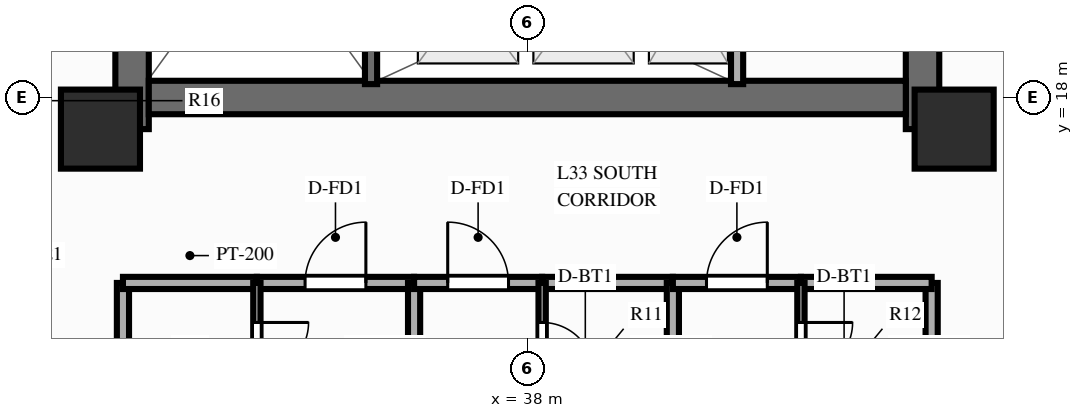
"""IFC4 building model, lengths in metres.
Left out: names, types, materials, properties, quantities, classifications, styles, units other than length and angle.
Written with IfcOpenShell. Run it as: python <this file> out.ifc"""

import sys

from ifc_helpers import new_model, si_unit, direction, frame, frame_2d, origin, origin_2d, place, context, subcontext, project, spatial, rectangle, extrude, source, transform, mapped, element, fill, save


model = new_model("IFC4")
c1 = context("Model", 3, precision=1e-05, world=origin(), true_north=direction((0.0, 1.0)))
c2 = subcontext(c1, "Body", "Model", "MODEL_VIEW")
j1 = project(units=[si_unit("LENGTHUNIT", "METRE"), si_unit("PLANEANGLEUNIT", "RADIAN")], contexts=[c1])
p1 = place(None, origin())
s1 = spatial("IfcSite", under=j1, at=p1, CompositionType="ELEMENT")
p2 = place(p1, origin())
s2 = spatial("IfcBuilding", under=s1, at=p2, CompositionType="ELEMENT")
p3 = place(p2, frame((0.0, 0.0, 104.85)))
s3 = spatial("IfcBuildingStorey", under=s2, at=p3, CompositionType="ELEMENT", Elevation=104.85)
p4 = place(p3, frame((31.5, 17.48, 0.0), z_axis=(0.0, 0.0, 1.0), x_axis=(0.0, 1.0, 0.0)))
e1 = element("IfcWall", 1, at=p4, inside=s3, PredefinedType="SHEAR", context=c2, shape_type="SweptSolid", body=[
    extrude(rectangle(XDim=19.04, YDim=0.55, at=frame_2d((9.52, 0.0))), origin(), (0.0, 0.0, 1.0), 3.0),
])
p5 = place(p4, frame((6.32, 0.0, 0.0)))
e2 = element("IfcOpeningElement", 2, at=p5, cuts=e1, PredefinedType="OPENING", context=c2, shape_type="SweptSolid", body=[
    extrude(rectangle(XDim=1.1, YDim=2.15, at=frame_2d((0.55, 1.075))), frame((0.0, 0.287, 0.0), z_axis=(0.0, -1.0, 0.0), x_axis=(1.0, 0.0, 0.0)), (0.0, 0.0, 1.0), 0.574),
])
p6 = place(p3, frame((44.5, 17.48, 0.0), z_axis=(0.0, 0.0, 1.0), x_axis=(0.0, 1.0, 0.0)))
e3 = element("IfcWall", 3, at=p6, inside=s3, PredefinedType="SHEAR", context=c2, shape_type="SweptSolid", body=[
    extrude(rectangle(XDim=19.04, YDim=0.55, at=frame_2d((9.52, 0.0))), origin(), (0.0, 0.0, 1.0), 3.0),
])
p7 = place(p6, frame((12.67, 0.0, 0.0), z_axis=(0.0, 0.0, 1.0), x_axis=(-1.0, 0.0, 0.0)))
e4 = element("IfcOpeningElement", 4, at=p7, cuts=e3, PredefinedType="OPENING", context=c2, shape_type="SweptSolid", body=[
    extrude(rectangle(XDim=1.1, YDim=2.15, at=frame_2d((0.55, 1.075))), frame((0.0, 0.287, 0.0), z_axis=(0.0, -1.0, 0.0), x_axis=(1.0, 0.0, 0.0)), (0.0, 0.0, 1.0), 0.574),
])
p8 = place(p3, frame((31.775, 18.0, 0.0), z_axis=(0.0, 0.0, 1.0), x_axis=(1.0, 0.0, 0.0)))
e5 = element("IfcWall", 5, at=p8, inside=s3, PredefinedType="SHEAR", context=c2, shape_type="SweptSolid", body=[
    extrude(rectangle(XDim=12.45, YDim=0.55, at=frame_2d((6.225, 0.0))), origin(), (0.0, 0.0, 1.0), 3.0),
])
m1 = source(origin(), c2, "Body", "SweptSolid", [
    extrude(rectangle(XDim=1.3, YDim=1.3, at=origin_2d()), origin(), (0.0, 0.0, 1.0), 3.0),
])
for number, where, z_axis, x_axis in (
    (6, (30.98, 17.48, 0.0), (0.0, 0.0, 1.0), (1.0, 0.0, 0.0)),
    (7, (45.02, 17.48, 0.0), (0.0, 0.0, 1.0), (1.0, 0.0, 0.0)),
):
    element("IfcColumn", number, at=place(p3, frame(where, z_axis=z_axis, x_axis=x_axis)), inside=s3, PredefinedType="COLUMN", context=c2, shape_type="MappedRepresentation", body=[
        mapped(m1, transform((0.0, 0.0, 0.0), scale=1.0)),
    ])
p9 = place(p3, frame((41.45, 18.22, 0.0), z_axis=(0.0, 0.0, 1.0), x_axis=(0.0, 1.0, 0.0)))
e8 = element("IfcWall", 8, at=p9, inside=s3, PredefinedType="PARTITIONING", context=c2, shape_type="SweptSolid", body=[
    extrude(rectangle(XDim=2.86, YDim=0.2, at=frame_2d((1.43, 0.0))), origin(), (0.0, 0.0, 1.0), 2.79),
])
p10 = place(p3, frame((35.43, 18.22, 0.0), z_axis=(0.0, 0.0, 1.0), x_axis=(0.0, 1.0, 0.0)))
e9 = element("IfcWall", 9, at=p10, inside=s3, PredefinedType="SOLIDWALL", context=c2, shape_type="SweptSolid", body=[
    extrude(rectangle(XDim=7.22, YDim=0.2, at=frame_2d((3.61, 0.0))), origin(), (0.0, 0.0, 1.0), 2.79),
])
p11 = place(p10, frame((6.68, 0.0, 0.0), z_axis=(0.0, 0.0, 1.0), x_axis=(-1.0, 0.0, 0.0)))
e10 = element("IfcOpeningElement", 10, at=p11, cuts=e9, PredefinedType="OPENING", context=c2, shape_type="SweptSolid", body=[
    extrude(rectangle(XDim=1.1, YDim=2.15, at=frame_2d((0.55, 1.075))), frame((0.0, 0.112, 0.0), z_axis=(0.0, -1.0, 0.0), x_axis=(1.0, 0.0, 0.0)), (0.0, 0.0, 1.0), 0.224),
])
for number, where, z_axis, x_axis in (
    (11, (31.35, 14.95, 0.0), (0.0, 0.0, 1.0), (0.0, -1.0, 0.0)),
    (12, (44.65, 14.95, 0.0), (0.0, 0.0, 1.0), (0.0, -1.0, 0.0)),
):
    element("IfcWall", number, at=place(p3, frame(where, z_axis=z_axis, x_axis=x_axis)), inside=s3, PredefinedType="PARTITIONING", context=c2, shape_type="SweptSolid", body=[
        extrude(rectangle(XDim=11.8, YDim=0.2, at=frame_2d((5.9, 0.0))), origin(), (0.0, 0.0, 1.0), 2.34),
    ])
p12 = place(p3, frame((31.35, 14.95, 0.0), z_axis=(0.0, 0.0, 1.0), x_axis=(1.0, 0.0, 0.0)))
e13 = element("IfcWall", 13, at=p12, inside=s3, PredefinedType="PARTITIONING", context=c2, shape_type="SweptSolid", body=[
    extrude(rectangle(XDim=2.202, YDim=0.2, at=frame_2d((1.101, 0.0))), origin(), (0.0, 0.0, 1.0), 2.79),
])
p13 = place(p3, frame((33.552, 14.95, 0.0), z_axis=(0.0, 0.0, 1.0), x_axis=(1.0, 0.0, 0.0)))
e14 = element("IfcWall", 14, at=p13, inside=s3, PredefinedType="PARTITIONING", context=c2, shape_type="SweptSolid", body=[
    extrude(rectangle(XDim=2.585, YDim=0.2, at=frame_2d((1.293, 0.0))), origin(), (0.0, 0.0, 1.0), 2.79),
])
p14 = place(p13, frame((0.793, 0.0, 0.0)))
e15 = element("IfcOpeningElement", 15, at=p14, cuts=e14, PredefinedType="OPENING", context=c2, shape_type="SweptSolid", body=[
    extrude(rectangle(XDim=1.0, YDim=2.15, at=frame_2d((0.5, 1.075))), frame((0.0, 0.112, 0.0), z_axis=(0.0, -1.0, 0.0), x_axis=(1.0, 0.0, 0.0)), (0.0, 0.0, 1.0), 0.224),
])
p15 = place(p3, frame((33.552, 14.95, 0.0), z_axis=(0.0, 0.0, 1.0), x_axis=(0.0, -1.0, 0.0)))
e16 = element("IfcWall", 16, at=p15, inside=s3, PredefinedType="PARTITIONING", context=c2, shape_type="SweptSolid", body=[
    extrude(rectangle(XDim=2.15, YDim=0.12, at=frame_2d((1.075, 0.0))), origin(), (0.0, 0.0, 1.0), 2.79),
])
p16 = place(p15, frame((0.65, 0.0, 0.0)))
e17 = element("IfcOpeningElement", 17, at=p16, cuts=e16, PredefinedType="OPENING", context=c2, shape_type="SweptSolid", body=[
    extrude(rectangle(XDim=0.85, YDim=2.05, at=frame_2d((0.425, 1.025))), frame((0.0, 0.072, 0.0), z_axis=(0.0, -1.0, 0.0), x_axis=(1.0, 0.0, 0.0)), (0.0, 0.0, 1.0), 0.144),
])
p17 = place(p3, frame((36.138, 14.95, 0.0), z_axis=(0.0, 0.0, 1.0), x_axis=(0.0, -1.0, 0.0)))
e18 = element("IfcWall", 18, at=p17, inside=s3, PredefinedType="PARTITIONING", context=c2, shape_type="SweptSolid", body=[
    extrude(rectangle(XDim=11.8, YDim=0.2, at=frame_2d((5.9, 0.0))), origin(), (0.0, 0.0, 1.0), 2.79),
])
p18 = place(p3, frame((36.138, 14.95, 0.0), z_axis=(0.0, 0.0, 1.0), x_axis=(1.0, 0.0, 0.0)))
e19 = element("IfcWall", 19, at=p18, inside=s3, PredefinedType="PARTITIONING", context=c2, shape_type="SweptSolid", body=[
    extrude(rectangle(XDim=2.106, YDim=0.2, at=frame_2d((1.053, 0.0))), origin(), (0.0, 0.0, 1.0), 2.79),
])
p19 = place(p18, frame((0.553, 0.0, 0.0)))
e20 = element("IfcOpeningElement", 20, at=p19, cuts=e19, PredefinedType="OPENING", context=c2, shape_type="SweptSolid", body=[
    extrude(rectangle(XDim=1.0, YDim=2.15, at=frame_2d((0.5, 1.075))), frame((0.0, 0.112, 0.0), z_axis=(0.0, -1.0, 0.0), x_axis=(1.0, 0.0, 0.0)), (0.0, 0.0, 1.0), 0.224),
])
p20 = place(p3, frame((38.244, 14.95, 0.0), z_axis=(0.0, 0.0, 1.0), x_axis=(1.0, 0.0, 0.0)))
e21 = element("IfcWall", 21, at=p20, inside=s3, PredefinedType="PARTITIONING", context=c2, shape_type="SweptSolid", body=[
    extrude(rectangle(XDim=2.15, YDim=0.2, at=frame_2d((1.075, 0.0))), origin(), (0.0, 0.0, 1.0), 2.79),
])
p21 = place(p3, frame((38.244, 14.95, 0.0), z_axis=(0.0, 0.0, 1.0), x_axis=(0.0, -1.0, 0.0)))
e22 = element("IfcWall", 22, at=p21, inside=s3, PredefinedType="PARTITIONING", context=c2, shape_type="SweptSolid", body=[
    extrude(rectangle(XDim=2.15, YDim=0.12, at=frame_2d((1.075, 0.0))), origin(), (0.0, 0.0, 1.0), 2.79),
])
p22 = place(p21, frame((0.65, 0.0, 0.0)))
e23 = element("IfcOpeningElement", 23, at=p22, cuts=e22, PredefinedType="OPENING", context=c2, shape_type="SweptSolid", body=[
    extrude(rectangle(XDim=0.85, YDim=2.05, at=frame_2d((0.425, 1.025))), frame((0.0, 0.072, 0.0), z_axis=(0.0, -1.0, 0.0), x_axis=(1.0, 0.0, 0.0)), (0.0, 0.0, 1.0), 0.144),
])
p23 = place(p3, frame((40.394, 14.95, 0.0), z_axis=(0.0, 0.0, 1.0), x_axis=(0.0, -1.0, 0.0)))
e24 = element("IfcWall", 24, at=p23, inside=s3, PredefinedType="PARTITIONING", context=c2, shape_type="SweptSolid", body=[
    extrude(rectangle(XDim=11.8, YDim=0.2, at=frame_2d((5.9, 0.0))), origin(), (0.0, 0.0, 1.0), 2.79),
])
p24 = place(p3, frame((40.394, 14.95, 0.0), z_axis=(0.0, 0.0, 1.0), x_axis=(1.0, 0.0, 0.0)))
e25 = element("IfcWall", 25, at=p24, inside=s3, PredefinedType="PARTITIONING", context=c2, shape_type="SweptSolid", body=[
    extrude(rectangle(XDim=2.106, YDim=0.2, at=frame_2d((1.053, 0.0))), origin(), (0.0, 0.0, 1.0), 2.79),
])
p25 = place(p24, frame((0.553, 0.0, 0.0)))
e26 = element("IfcOpeningElement", 26, at=p25, cuts=e25, PredefinedType="OPENING", context=c2, shape_type="SweptSolid", body=[
    extrude(rectangle(XDim=1.0, YDim=2.15, at=frame_2d((0.5, 1.075))), frame((0.0, 0.112, 0.0), z_axis=(0.0, -1.0, 0.0), x_axis=(1.0, 0.0, 0.0)), (0.0, 0.0, 1.0), 0.224),
])
p26 = place(p3, frame((42.5, 14.95, 0.0), z_axis=(0.0, 0.0, 1.0), x_axis=(1.0, 0.0, 0.0)))
e27 = element("IfcWall", 27, at=p26, inside=s3, PredefinedType="PARTITIONING", context=c2, shape_type="SweptSolid", body=[
    extrude(rectangle(XDim=2.15, YDim=0.2, at=frame_2d((1.075, 0.0))), origin(), (0.0, 0.0, 1.0), 2.79),
])
p27 = place(p3, frame((42.5, 14.95, 0.0), z_axis=(0.0, 0.0, 1.0), x_axis=(0.0, -1.0, 0.0)))
e28 = element("IfcWall", 28, at=p27, inside=s3, PredefinedType="PARTITIONING", context=c2, shape_type="SweptSolid", body=[
    extrude(rectangle(XDim=2.15, YDim=0.12, at=frame_2d((1.075, 0.0))), origin(), (0.0, 0.0, 1.0), 2.79),
])
p28 = place(p27, frame((0.65, 0.0, 0.0)))
e29 = element("IfcOpeningElement", 29, at=p28, cuts=e28, PredefinedType="OPENING", context=c2, shape_type="SweptSolid", body=[
    extrude(rectangle(XDim=0.85, YDim=2.05, at=frame_2d((0.425, 1.025))), frame((0.0, 0.072, 0.0), z_axis=(0.0, -1.0, 0.0), x_axis=(1.0, 0.0, 0.0)), (0.0, 0.0, 1.0), 0.144),
])
m2 = source(origin(), c2, "Body", "SweptSolid", [
    extrude(rectangle(XDim=1.0, YDim=2.15, at=frame_2d((0.5, 1.075))), frame((0.0, 0.025, 0.0), z_axis=(0.0, -1.0, 0.0), x_axis=(1.0, 0.0, 0.0)), (0.0, 0.0, 1.0), 0.05),
])
p29 = place(p14, origin())
e30 = element("IfcDoor", 30, at=p29, inside=s3, OperationType="SINGLE_SWING_RIGHT", PredefinedType="DOOR", context=c2, shape_type="MappedRepresentation", body=[
    mapped(m2, transform((0.0, 0.0, 0.0), scale=1.0)),
])
fill(e15, e30)
m3 = source(origin(), c2, "Body", "SweptSolid", [
    extrude(rectangle(XDim=0.85, YDim=2.05, at=frame_2d((0.425, 1.025))), frame((0.0, 0.025, 0.0), z_axis=(0.0, -1.0, 0.0), x_axis=(1.0, 0.0, 0.0)), (0.0, 0.0, 1.0), 0.05),
])
p30 = place(p16, origin())
e31 = element("IfcDoor", 31, at=p30, inside=s3, OperationType="SINGLE_SWING_LEFT", PredefinedType="DOOR", context=c2, shape_type="MappedRepresentation", body=[
    mapped(m3, transform((0.0, 0.0, 0.0), scale=1.0)),
])
fill(e17, e31)
p31 = place(p19, origin())
e32 = element("IfcDoor", 32, at=p31, inside=s3, OperationType="SINGLE_SWING_LEFT", PredefinedType="DOOR", context=c2, shape_type="MappedRepresentation", body=[
    mapped(m2, transform((0.0, 0.0, 0.0), scale=1.0)),
])
fill(e20, e32)
p32 = place(p22, origin())
e33 = element("IfcDoor", 33, at=p32, inside=s3, OperationType="SINGLE_SWING_RIGHT", PredefinedType="DOOR", context=c2, shape_type="MappedRepresentation", body=[
    mapped(m3, transform((0.0, 0.0, 0.0), scale=1.0)),
])
fill(e23, e33)
p33 = place(p25, origin())
e34 = element("IfcDoor", 34, at=p33, inside=s3, OperationType="SINGLE_SWING_RIGHT", PredefinedType="DOOR", context=c2, shape_type="MappedRepresentation", body=[
    mapped(m2, transform((0.0, 0.0, 0.0), scale=1.0)),
])
fill(e26, e34)
p34 = place(p28, origin())
e35 = element("IfcDoor", 35, at=p34, inside=s3, OperationType="SINGLE_SWING_LEFT", PredefinedType="DOOR", context=c2, shape_type="MappedRepresentation", body=[
    mapped(m3, transform((0.0, 0.0, 0.0), scale=1.0)),
])
fill(e29, e35)
save(model, sys.argv[1])
